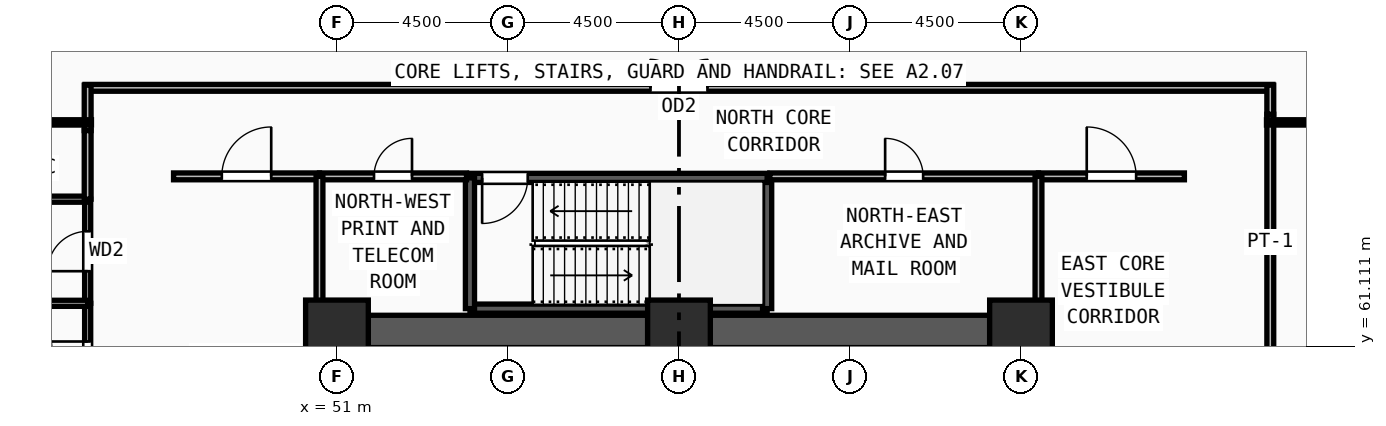
"""IFC4 building model, lengths in metres.
Left out: names, types, materials, properties, quantities, classifications, styles, units other than length and angle.
Written with IfcOpenShell. Run it as: python <this file> out.ifc"""

import sys

from ifc_helpers import new_model, si_unit, direction, frame, frame_2d, origin, origin_2d, place, context, subcontext, project, spatial, rectangle, extrude, source, transform, mapped, element, fill, save


model = new_model("IFC4")
c1 = context("Model", 3, precision=1e-05, world=origin(), true_north=direction((0.0, 1.0)))
c2 = subcontext(c1, "Body", "Model", "MODEL_VIEW")
j1 = project(units=[si_unit("LENGTHUNIT", "METRE"), si_unit("PLANEANGLEUNIT", "RADIAN")], contexts=[c1])
p1 = place(None, origin())
s1 = spatial("IfcSite", under=j1, at=p1, CompositionType="ELEMENT")
p2 = place(p1, origin())
s2 = spatial("IfcBuilding", under=s1, at=p2, CompositionType="ELEMENT")
p3 = place(p2, frame((0.0, 0.0, 28.5)))
s3 = spatial("IfcBuildingStorey", under=s2, at=p3, CompositionType="ELEMENT", Elevation=28.5)
m1 = source(origin(), c2, "Body", "SweptSolid", [
    extrude(rectangle(XDim=1.65, YDim=1.65, at=origin_2d()), origin(), (0.0, 0.0, 1.0), 3.75),
])
for number, where, z_axis, x_axis in (
    (1, (69.0, 61.5, 0.0), (0.0, 0.0, 1.0), (1.0, 0.0, 0.0)),
    (2, (60.0, 61.5, 0.0), (0.0, 0.0, 1.0), (1.0, 0.0, 0.0)),
    (3, (51.0, 61.5, 0.0), (0.0, 0.0, 1.0), (1.0, 0.0, 0.0)),
):
    element("IfcColumn", number, at=place(p3, frame(where, z_axis=z_axis, x_axis=x_axis)), inside=s3, PredefinedType="COLUMN", context=c2, shape_type="MappedRepresentation", body=[
        mapped(m1, transform((0.0, 0.0, 0.0), x_axis=(1.0, 0.0, 0.0), y_axis=(0.0, 1.0, 0.0), z_axis=(0.0, 0.0, 1.0), scale=1.0)),
    ])
for number, where, z_axis, x_axis in (
    (4, (51.825, 61.5, 0.0), (0.0, 0.0, 1.0), (1.0, 0.0, 0.0)),
    (5, (60.825, 61.5, 0.0), (0.0, 0.0, 1.0), (1.0, 0.0, 0.0)),
):
    element("IfcWall", number, at=place(p3, frame(where, z_axis=z_axis, x_axis=x_axis)), inside=s3, PredefinedType="SHEAR", context=c2, shape_type="SweptSolid", body=[
        extrude(rectangle(XDim=7.35, YDim=0.85, at=frame_2d((3.675, 0.0))), origin(), (0.0, 0.0, 1.0), 3.57),
    ])
p4 = place(p3, frame((54.5, 62.1, 0.0), z_axis=(0.0, 0.0, 1.0), x_axis=(1.0, 0.0, 0.0)))
e6 = element("IfcWall", 6, at=p4, inside=s3, PredefinedType="SOLIDWALL", context=c2, shape_type="SweptSolid", body=[
    extrude(rectangle(XDim=7.82, YDim=0.24, at=frame_2d((3.91, 0.0))), origin(), (0.0, 0.0, 1.0), 3.57),
])
p5 = place(p3, frame((62.32, 62.1, 0.0), z_axis=(0.0, 0.0, 1.0), x_axis=(0.0, 1.0, 0.0)))
e7 = element("IfcWall", 7, at=p5, inside=s3, PredefinedType="SOLIDWALL", context=c2, shape_type="SweptSolid", body=[
    extrude(rectangle(XDim=3.44, YDim=0.24, at=frame_2d((1.72, 0.0))), origin(), (0.0, 0.0, 1.0), 3.57),
])
p6 = place(p3, frame((62.32, 65.54, 0.0), z_axis=(0.0, 0.0, 1.0), x_axis=(-1.0, 0.0, 0.0)))
e8 = element("IfcWall", 8, at=p6, inside=s3, PredefinedType="SOLIDWALL", context=c2, shape_type="SweptSolid", body=[
    extrude(rectangle(XDim=7.82, YDim=0.24, at=frame_2d((3.91, 0.0))), origin(), (0.0, 0.0, 1.0), 3.57),
])
m2 = source(origin(), c2, "Body", "SweptSolid", [
    extrude(rectangle(XDim=1.2, YDim=2.2, at=frame_2d((0.6, 1.1))), frame((0.0, 0.13, 0.0), z_axis=(0.0, -1.0, 0.0), x_axis=(1.0, 0.0, 0.0)), (0.0, 0.0, 1.0), 0.26),
])
p7 = place(p6, frame((6.3, 0.0, 0.0)))
e9 = element("IfcOpeningElement", 9, at=p7, cuts=e8, PredefinedType="OPENING", context=c2, shape_type="MappedRepresentation", body=[
    mapped(m2, transform((0.0, 0.0, 0.0), x_axis=(1.0, 0.0, 0.0), y_axis=(0.0, 1.0, 0.0), z_axis=(0.0, 0.0, 1.0), scale=1.0)),
])
p8 = place(p3, frame((54.5, 65.54, 0.0), z_axis=(0.0, 0.0, 1.0), x_axis=(0.0, -1.0, 0.0)))
e10 = element("IfcWall", 10, at=p8, inside=s3, PredefinedType="SOLIDWALL", context=c2, shape_type="SweptSolid", body=[
    extrude(rectangle(XDim=3.44, YDim=0.24, at=frame_2d((1.72, 0.0))), origin(), (0.0, 0.0, 1.0), 3.57),
])
p9 = place(p3, frame((44.44, 59.28, 0.0), z_axis=(0.0, 0.0, 1.0), x_axis=(0.0, 1.0, 0.0)))
e11 = element("IfcWall", 11, at=p9, inside=s3, PredefinedType="PARTITIONING", context=c2, shape_type="SweptSolid", body=[
    extrude(rectangle(XDim=2.96, YDim=0.16, at=frame_2d((1.48, 0.0))), origin(), (0.0, 0.0, 1.0), 3.57),
])
m3 = source(origin(), c2, "Body", "SweptSolid", [
    extrude(rectangle(XDim=0.95, YDim=2.15, at=frame_2d((0.475, 1.075))), frame((0.0, 0.09, 0.0), z_axis=(0.0, -1.0, 0.0), x_axis=(1.0, 0.0, 0.0)), (0.0, 0.0, 1.0), 0.18),
])
p10 = place(p9, frame((1.005, 0.0, 0.0)))
e12 = element("IfcOpeningElement", 12, at=p10, cuts=e11, PredefinedType="OPENING", context=c2, shape_type="MappedRepresentation", body=[
    mapped(m3, transform((0.0, 0.0, 0.0), x_axis=(1.0, 0.0, 0.0), y_axis=(0.0, 1.0, 0.0), z_axis=(0.0, 0.0, 1.0), scale=1.0)),
])
p11 = place(p3, frame((44.44, 62.24, 0.0), z_axis=(0.0, 0.0, 1.0), x_axis=(0.0, 1.0, 0.0)))
e13 = element("IfcWall", 13, at=p11, inside=s3, PredefinedType="PARTITIONING", context=c2, shape_type="SweptSolid", body=[
    extrude(rectangle(XDim=2.74, YDim=0.16, at=frame_2d((1.37, 0.0))), origin(), (0.0, 0.0, 1.0), 3.57),
])
m4 = source(origin(), c2, "Body", "SweptSolid", [
    extrude(rectangle(XDim=1.05, YDim=2.15, at=frame_2d((0.525, 1.075))), frame((0.0, 0.09, 0.0), z_axis=(0.0, -1.0, 0.0), x_axis=(1.0, 0.0, 0.0)), (0.0, 0.0, 1.0), 0.18),
])
p12 = place(p11, frame((0.845, 0.0, 0.0)))
e14 = element("IfcOpeningElement", 14, at=p12, cuts=e13, PredefinedType="OPENING", context=c2, shape_type="MappedRepresentation", body=[
    mapped(m4, transform((0.0, 0.0, 0.0), x_axis=(1.0, 0.0, 0.0), y_axis=(0.0, 1.0, 0.0), z_axis=(0.0, 0.0, 1.0), scale=1.0)),
])
p13 = place(p3, frame((50.54, 65.58, 0.0), z_axis=(0.0, 0.0, 1.0), x_axis=(1.0, 0.0, 0.0)))
e15 = element("IfcWall", 15, at=p13, inside=s3, PredefinedType="PARTITIONING", context=c2, shape_type="SweptSolid", body=[
    extrude(rectangle(XDim=3.87, YDim=0.18, at=frame_2d((1.935, 0.0))), origin(), (0.0, 0.0, 1.0), 3.57),
])
m5 = source(origin(), c2, "Body", "SweptSolid", [
    extrude(rectangle(XDim=1.0, YDim=2.2, at=frame_2d((0.5, 1.1))), frame((0.0, 0.1, 0.0), z_axis=(0.0, -1.0, 0.0), x_axis=(1.0, 0.0, 0.0)), (0.0, 0.0, 1.0), 0.2),
])
p14 = place(p13, frame((1.435, 0.0, 0.0)))
e16 = element("IfcOpeningElement", 16, at=p14, cuts=e15, PredefinedType="OPENING", context=c2, shape_type="MappedRepresentation", body=[
    mapped(m5, transform((0.0, 0.0, 0.0), x_axis=(1.0, 0.0, 0.0), y_axis=(0.0, 1.0, 0.0), z_axis=(0.0, 0.0, 1.0), scale=1.0)),
])
p15 = place(p3, frame((62.39, 65.58, 0.0), z_axis=(0.0, 0.0, 1.0), x_axis=(1.0, 0.0, 0.0)))
e17 = element("IfcWall", 17, at=p15, inside=s3, PredefinedType="PARTITIONING", context=c2, shape_type="SweptSolid", body=[
    extrude(rectangle(XDim=7.07, YDim=0.18, at=frame_2d((3.535, 0.0))), origin(), (0.0, 0.0, 1.0), 3.57),
])
p16 = place(p15, frame((3.035, 0.0, 0.0)))
e18 = element("IfcOpeningElement", 18, at=p16, cuts=e17, PredefinedType="OPENING", context=c2, shape_type="MappedRepresentation", body=[
    mapped(m5, transform((0.0, 0.0, 0.0), x_axis=(1.0, 0.0, 0.0), y_axis=(0.0, 1.0, 0.0), z_axis=(0.0, 0.0, 1.0), scale=1.0)),
])
p17 = place(p3, frame((46.7, 65.58, 0.0), z_axis=(0.0, 0.0, 1.0), x_axis=(1.0, 0.0, 0.0)))
e19 = element("IfcWall", 19, at=p17, inside=s3, PredefinedType="PARTITIONING", context=c2, shape_type="SweptSolid", body=[
    extrude(rectangle(XDim=3.84, YDim=0.18, at=frame_2d((1.92, 0.0))), origin(), (0.0, 0.0, 1.0), 3.57),
])
m6 = source(origin(), c2, "Body", "SweptSolid", [
    extrude(rectangle(XDim=1.3, YDim=2.2, at=frame_2d((0.65, 1.1))), frame((0.0, 0.1, 0.0), z_axis=(0.0, -1.0, 0.0), x_axis=(1.0, 0.0, 0.0)), (0.0, 0.0, 1.0), 0.2),
])
p18 = place(p17, frame((1.27, 0.0, 0.0)))
e20 = element("IfcOpeningElement", 20, at=p18, cuts=e19, PredefinedType="OPENING", context=c2, shape_type="MappedRepresentation", body=[
    mapped(m6, transform((0.0, 0.0, 0.0), x_axis=(1.0, 0.0, 0.0), y_axis=(0.0, 1.0, 0.0), z_axis=(0.0, 0.0, 1.0), scale=1.0)),
])
p19 = place(p3, frame((69.46, 65.58, 0.0), z_axis=(0.0, 0.0, 1.0), x_axis=(1.0, 0.0, 0.0)))
e21 = element("IfcWall", 21, at=p19, inside=s3, PredefinedType="PARTITIONING", context=c2, shape_type="SweptSolid", body=[
    extrude(rectangle(XDim=3.84, YDim=0.18, at=frame_2d((1.92, 0.0))), origin(), (0.0, 0.0, 1.0), 3.57),
])
p20 = place(p19, frame((1.27, 0.0, 0.0)))
e22 = element("IfcOpeningElement", 22, at=p20, cuts=e21, PredefinedType="OPENING", context=c2, shape_type="MappedRepresentation", body=[
    mapped(m6, transform((0.0, 0.0, 0.0), x_axis=(1.0, 0.0, 0.0), y_axis=(0.0, 1.0, 0.0), z_axis=(0.0, 0.0, 1.0), scale=1.0)),
])
p21 = place(p3, frame((75.56, 67.215, 0.0), z_axis=(0.0, 0.0, 1.0), x_axis=(0.0, -1.0, 0.0)))
e23 = element("IfcWall", 23, at=p21, inside=s3, PredefinedType="PARTITIONING", context=c2, shape_type="SweptSolid", body=[
    extrude(rectangle(XDim=15.43, YDim=0.18, at=frame_2d((7.715, 0.0))), origin(), (0.0, 0.0, 1.0), 3.57),
])
m7 = source(origin(), c2, "Body", "SweptSolid", [
    extrude(rectangle(XDim=1.5, YDim=2.2, at=frame_2d((0.75, 1.1))), frame((0.0, 0.1, 0.0), z_axis=(0.0, -1.0, 0.0), x_axis=(1.0, 0.0, 0.0)), (0.0, 0.0, 1.0), 0.2),
])
p22 = place(p21, frame((6.965, 0.0, 0.0)))
e24 = element("IfcOpeningElement", 24, at=p22, cuts=e23, PredefinedType="OPENING", context=c2, shape_type="MappedRepresentation", body=[
    mapped(m7, transform((0.0, 0.0, 0.0), x_axis=(1.0, 0.0, 0.0), y_axis=(0.0, 1.0, 0.0), z_axis=(0.0, 0.0, 1.0), scale=1.0)),
])
p23 = place(p3, frame((44.37, 67.91, 0.0), z_axis=(0.0, 0.0, 1.0), x_axis=(1.0, 0.0, 0.0)))
e25 = element("IfcWall", 25, at=p23, inside=s3, PredefinedType="PARTITIONING", context=c2, shape_type="SweptSolid", body=[
    extrude(rectangle(XDim=31.26, YDim=0.18, at=frame_2d((15.63, 0.0))), origin(), (0.0, 0.0, 1.0), 3.57),
])
p24 = place(p23, frame((14.88, 0.0, 0.0)))
e26 = element("IfcOpeningElement", 26, at=p24, cuts=e25, PredefinedType="OPENING", context=c2, shape_type="MappedRepresentation", body=[
    mapped(m7, transform((0.0, 0.0, 0.0), x_axis=(1.0, 0.0, 0.0), y_axis=(0.0, 1.0, 0.0), z_axis=(0.0, 0.0, 1.0), scale=1.0)),
])
for number, where, z_axis, x_axis in (
    (27, (39.98, 62.24, 0.0), (0.0, 0.0, 1.0), (1.0, 0.0, 0.0)),
    (28, (39.98, 64.98, 0.0), (0.0, 0.0, 1.0), (1.0, 0.0, 0.0)),
):
    element("IfcWall", number, at=place(p3, frame(where, z_axis=z_axis, x_axis=x_axis)), inside=s3, PredefinedType="PARTITIONING", context=c2, shape_type="SweptSolid", body=[
        extrude(rectangle(XDim=4.46, YDim=0.16, at=frame_2d((2.23, 0.0))), origin(), (0.0, 0.0, 1.0), 3.57),
    ])
for number, where, z_axis, x_axis in (
    (29, (50.54, 61.95, 0.0), (0.0, 0.0, 1.0), (0.0, 1.0, 0.0)),
    (30, (69.46, 61.95, 0.0), (0.0, 0.0, 1.0), (0.0, 1.0, 0.0)),
):
    element("IfcWall", number, at=place(p3, frame(where, z_axis=z_axis, x_axis=x_axis)), inside=s3, PredefinedType="PARTITIONING", context=c2, shape_type="SweptSolid", body=[
        extrude(rectangle(XDim=3.63, YDim=0.18, at=frame_2d((1.815, 0.0))), origin(), (0.0, 0.0, 1.0), 3.57),
    ])
p25 = place(p3, frame((44.44, 66.785, 0.0), z_axis=(0.0, 0.0, 1.0), x_axis=(0.0, 1.0, 0.0)))
e31 = element("IfcWall", 31, at=p25, inside=s3, PredefinedType="PARTITIONING", context=c2, shape_type="SweptSolid", body=[
    extrude(rectangle(XDim=1.195, YDim=0.18, at=frame_2d((0.598, 0.0))), origin(), (0.0, 0.0, 1.0), 3.57),
])
p26 = place(p3, frame((75.56, 67.98, 0.0), z_axis=(0.0, 0.0, 1.0), x_axis=(0.0, -1.0, 0.0)))
e32 = element("IfcWall", 32, at=p26, inside=s3, PredefinedType="PARTITIONING", context=c2, shape_type="SweptSolid", body=[
    extrude(rectangle(XDim=0.765, YDim=0.18, at=frame_2d((0.382, 0.0))), origin(), (0.0, 0.0, 1.0), 3.57),
])
p27 = place(p3, frame((44.44, 64.98, 0.0), z_axis=(0.0, 0.0, 1.0), x_axis=(0.0, 1.0, 0.0)))
e33 = element("IfcWall", 33, at=p27, inside=s3, PredefinedType="PARTITIONING", context=c2, shape_type="SweptSolid", body=[
    extrude(rectangle(XDim=1.805, YDim=0.18, at=frame_2d((0.902, 0.0))), origin(), (0.0, 0.0, 1.0), 3.57),
])
p28 = place(p3, frame((44.54, 67.0, 0.0), z_axis=(0.0, 0.0, 1.0), x_axis=(-1.0, 0.0, 0.0)))
e34 = element("IfcWall", 34, at=p28, inside=s3, PredefinedType="PARTITIONING", context=c2, shape_type="SweptSolid", body=[
    extrude(rectangle(XDim=23.376, YDim=0.14, at=frame_2d((11.688, 0.0))), origin(), (0.0, 0.0, 1.0), 2.655),
])
p29 = place(p3, frame((75.46, 67.0, 0.0), z_axis=(0.0, 0.0, 1.0), x_axis=(1.0, 0.0, 0.0)))
e35 = element("IfcWall", 35, at=p29, inside=s3, PredefinedType="PARTITIONING", context=c2, shape_type="SweptSolid", body=[
    extrude(rectangle(XDim=23.41, YDim=0.14, at=frame_2d((11.705, 0.0))), origin(), (0.0, 0.0, 1.0), 2.655),
])
m8 = source(origin(), c2, "Body", "SweptSolid", [
    extrude(rectangle(XDim=1.2, YDim=2.2, at=frame_2d((0.6, 1.1))), frame((0.0, 0.025, 0.0), z_axis=(0.0, -1.0, 0.0), x_axis=(1.0, 0.0, 0.0)), (0.0, 0.0, 1.0), 0.05),
])
p30 = place(p7, origin())
e36 = element("IfcDoor", 36, at=p30, inside=s3, OperationType="SINGLE_SWING_RIGHT", PredefinedType="DOOR", context=c2, shape_type="MappedRepresentation", body=[
    mapped(m8, transform((0.0, 0.0, 0.0), x_axis=(1.0, 0.0, 0.0), y_axis=(0.0, 1.0, 0.0), z_axis=(0.0, 0.0, 1.0), scale=1.0)),
])
fill(e9, e36)
m9 = source(origin(), c2, "Body", "SweptSolid", [
    extrude(rectangle(XDim=0.95, YDim=2.15, at=frame_2d((0.475, 1.075))), frame((0.0, 0.025, 0.0), z_axis=(0.0, -1.0, 0.0), x_axis=(1.0, 0.0, 0.0)), (0.0, 0.0, 1.0), 0.05),
])
p31 = place(p10, origin())
e37 = element("IfcDoor", 37, at=p31, inside=s3, OperationType="SINGLE_SWING_RIGHT", PredefinedType="DOOR", context=c2, shape_type="MappedRepresentation", body=[
    mapped(m9, transform((0.0, 0.0, 0.0), x_axis=(1.0, 0.0, 0.0), y_axis=(0.0, 1.0, 0.0), z_axis=(0.0, 0.0, 1.0), scale=1.0)),
])
fill(e12, e37)
m10 = source(origin(), c2, "Body", "SweptSolid", [
    extrude(rectangle(XDim=1.05, YDim=2.15, at=frame_2d((0.525, 1.075))), frame((0.0, 0.025, 0.0), z_axis=(0.0, -1.0, 0.0), x_axis=(1.0, 0.0, 0.0)), (0.0, 0.0, 1.0), 0.05),
])
p32 = place(p12, origin())
e38 = element("IfcDoor", 38, at=p32, inside=s3, OperationType="SINGLE_SWING_LEFT", PredefinedType="DOOR", context=c2, shape_type="MappedRepresentation", body=[
    mapped(m10, transform((0.0, 0.0, 0.0), x_axis=(1.0, 0.0, 0.0), y_axis=(0.0, 1.0, 0.0), z_axis=(0.0, 0.0, 1.0), scale=1.0)),
])
fill(e14, e38)
m11 = source(origin(), c2, "Body", "SweptSolid", [
    extrude(rectangle(XDim=1.0, YDim=2.2, at=frame_2d((0.5, 1.1))), frame((0.0, 0.025, 0.0), z_axis=(0.0, -1.0, 0.0), x_axis=(1.0, 0.0, 0.0)), (0.0, 0.0, 1.0), 0.05),
])
p33 = place(p14, origin())
e39 = element("IfcDoor", 39, at=p33, inside=s3, OperationType="SINGLE_SWING_RIGHT", PredefinedType="DOOR", context=c2, shape_type="MappedRepresentation", body=[
    mapped(m11, transform((0.0, 0.0, 0.0), x_axis=(1.0, 0.0, 0.0), y_axis=(0.0, 1.0, 0.0), z_axis=(0.0, 0.0, 1.0), scale=1.0)),
])
fill(e16, e39)
p34 = place(p16, origin())
e40 = element("IfcDoor", 40, at=p34, inside=s3, OperationType="SINGLE_SWING_LEFT", PredefinedType="DOOR", context=c2, shape_type="MappedRepresentation", body=[
    mapped(m11, transform((0.0, 0.0, 0.0), x_axis=(1.0, 0.0, 0.0), y_axis=(0.0, 1.0, 0.0), z_axis=(0.0, 0.0, 1.0), scale=1.0)),
])
fill(e18, e40)
m12 = source(origin(), c2, "Body", "SweptSolid", [
    extrude(rectangle(XDim=1.3, YDim=2.2, at=frame_2d((0.65, 1.1))), frame((0.0, 0.025, 0.0), z_axis=(0.0, -1.0, 0.0), x_axis=(1.0, 0.0, 0.0)), (0.0, 0.0, 1.0), 0.05),
])
p35 = place(p18, origin())
e41 = element("IfcDoor", 41, at=p35, inside=s3, OperationType="SINGLE_SWING_RIGHT", PredefinedType="DOOR", context=c2, shape_type="MappedRepresentation", body=[
    mapped(m12, transform((0.0, 0.0, 0.0), x_axis=(1.0, 0.0, 0.0), y_axis=(0.0, 1.0, 0.0), z_axis=(0.0, 0.0, 1.0), scale=1.0)),
])
fill(e20, e41)
p36 = place(p20, origin())
e42 = element("IfcDoor", 42, at=p36, inside=s3, OperationType="SINGLE_SWING_LEFT", PredefinedType="DOOR", context=c2, shape_type="MappedRepresentation", body=[
    mapped(m12, transform((0.0, 0.0, 0.0), x_axis=(1.0, 0.0, 0.0), y_axis=(0.0, 1.0, 0.0), z_axis=(0.0, 0.0, 1.0), scale=1.0)),
])
fill(e22, e42)
m13 = source(origin(), c2, "Body", "SweptSolid", [
    extrude(rectangle(XDim=1.5, YDim=2.2, at=frame_2d((0.75, 1.1))), frame((0.0, 0.025, 0.0), z_axis=(0.0, -1.0, 0.0), x_axis=(1.0, 0.0, 0.0)), (0.0, 0.0, 1.0), 0.05),
])
p37 = place(p24, origin())
e43 = element("IfcDoor", 43, at=p37, inside=s3, OperationType="DOUBLE_DOOR_SINGLE_SWING", PredefinedType="DOOR", context=c2, shape_type="MappedRepresentation", body=[
    mapped(m13, transform((0.0, 0.0, 0.0), x_axis=(1.0, 0.0, 0.0), y_axis=(0.0, 1.0, 0.0), z_axis=(0.0, 0.0, 1.0), scale=1.0)),
])
fill(e26, e43)
save(model, sys.argv[1])
